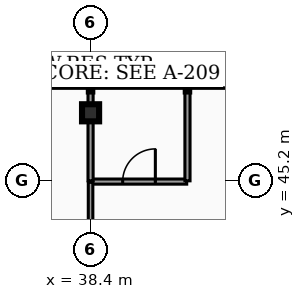
"""IFC4 building model, lengths in metres.
Left out: names, types, materials, properties, quantities, classifications, styles, units other than length and angle.
Written with IfcOpenShell. Run it as: python <this file> out.ifc"""

import sys

from ifc_helpers import new_model, si_unit, direction, frame, frame_2d, origin, origin_2d, place, context, subcontext, project, spatial, rectangle, hollow_rectangle, extrude, element, fill, save


model = new_model("IFC4")
c1 = context("Model", 3, precision=1e-05, world=origin(), true_north=direction((0.0, 1.0)))
c2 = subcontext(c1, "Body", "Model", "MODEL_VIEW")
j1 = project(units=[si_unit("LENGTHUNIT", "METRE"), si_unit("PLANEANGLEUNIT", "RADIAN")], contexts=[c1])
p1 = place(None, origin())
s1 = spatial("IfcSite", under=j1, at=p1, CompositionType="ELEMENT")
p2 = place(p1, origin())
s2 = spatial("IfcBuilding", under=s1, at=p2, CompositionType="ELEMENT")
p3 = place(p2, frame((0.0, 0.0, 278.8)))
s3 = spatial("IfcBuildingStorey", under=s2, at=p3, CompositionType="ELEMENT", Elevation=278.8)
p4 = place(p3, frame((38.4, 46.983, 0.0), z_axis=(0.0, 0.0, 1.0), x_axis=(1.0, 0.0, 0.0)))
e1 = element("IfcColumn", 1, at=p4, inside=s3, PredefinedType="COLUMN", context=c2, shape_type="SweptSolid", body=[
    extrude(hollow_rectangle(XDim=0.45, YDim=0.45, WallThickness=0.022, at=origin_2d()), origin(), (0.0, 0.0, 1.0), 3.18),
])
p5 = place(p3, frame((38.42, 45.173, 0.0), z_axis=(0.0, 0.0, 1.0), x_axis=(1.0, 0.0, 0.0)))
e2 = element("IfcWall", 2, at=p5, inside=s3, PredefinedType="PARTITIONING", context=c2, shape_type="SweptSolid", body=[
    extrude(rectangle(XDim=2.51, YDim=0.135, at=frame_2d((1.255, 0.0))), origin(), (0.0, 0.0, 1.0), 2.235),
])
p6 = place(p5, frame((0.825, 0.0, 0.0)))
e3 = element("IfcOpeningElement", 3, at=p6, cuts=e2, PredefinedType="OPENING", context=c2, shape_type="SweptSolid", body=[
    extrude(rectangle(XDim=0.86, YDim=2.05, at=frame_2d((0.43, 1.025))), frame((0.0, 0.077, 0.0), z_axis=(0.0, -1.0, 0.0), x_axis=(1.0, 0.0, 0.0)), (0.0, 0.0, 1.0), 0.155),
])
p7 = place(p3, frame((40.95, 45.193, 0.0), z_axis=(0.0, 0.0, 1.0), x_axis=(0.0, 1.0, 0.0)))
e4 = element("IfcWall", 4, at=p7, inside=s3, PredefinedType="PARTITIONING", context=c2, shape_type="SweptSolid", body=[
    extrude(rectangle(XDim=2.425, YDim=0.135, at=frame_2d((1.212, 0.0))), origin(), (0.0, 0.0, 1.0), 2.235),
])
p8 = place(p3, frame((38.4, 43.415, 0.0), z_axis=(0.0, 0.0, 1.0), x_axis=(0.0, 1.0, 0.0)))
e5 = element("IfcWall", 5, at=p8, inside=s3, PredefinedType="PARTITIONING", context=c2, shape_type="SweptSolid", body=[
    extrude(rectangle(XDim=1.738, YDim=0.12, at=frame_2d((0.869, 0.0))), origin(), (0.0, 0.0, 1.0), 2.235),
])
p9 = place(p3, frame((38.4, 45.193, 0.0), z_axis=(0.0, 0.0, 1.0), x_axis=(0.0, 1.0, 0.0)))
e6 = element("IfcWall", 6, at=p9, inside=s3, PredefinedType="PARTITIONING", context=c2, shape_type="SweptSolid", body=[
    extrude(rectangle(XDim=2.425, YDim=0.135, at=frame_2d((1.212, 0.0))), origin(), (0.0, 0.0, 1.0), 2.235),
])
p10 = place(p6, origin())
e7 = element("IfcDoor", 7, at=p10, inside=s3, OperationType="SINGLE_SWING_RIGHT", PredefinedType="DOOR", context=c2, shape_type="SweptSolid", body=[
    extrude(rectangle(XDim=0.86, YDim=2.05, at=frame_2d((0.43, 1.025))), frame((0.0, 0.025, 0.0), z_axis=(0.0, -1.0, 0.0), x_axis=(1.0, 0.0, 0.0)), (0.0, 0.0, 1.0), 0.05),
])
fill(e3, e7)
save(model, sys.argv[1])
